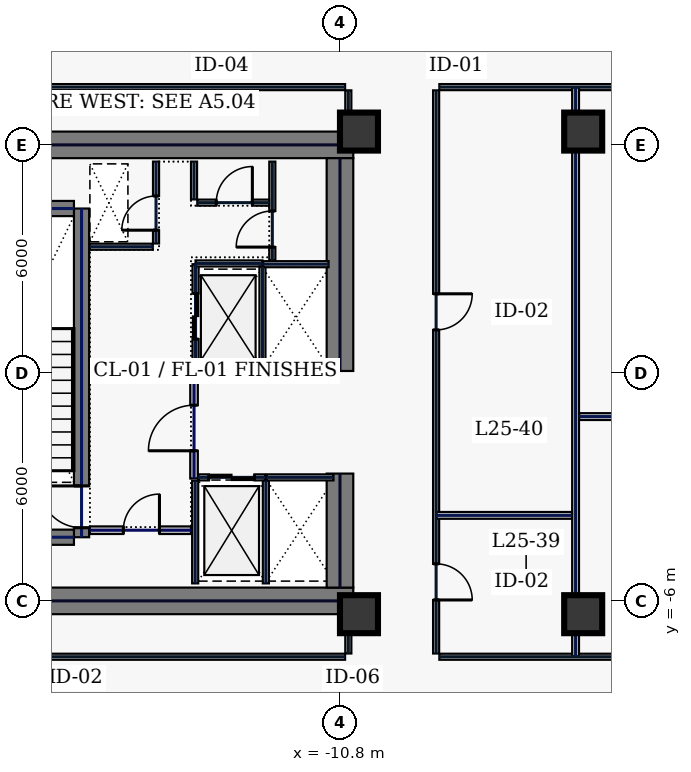
"""IFC4 building model, lengths in metres.
Left out: names, types, materials, properties, quantities, classifications, styles, units other than length and angle.
Written with IfcOpenShell. Run it as: python <this file> out.ifc"""

import sys

from ifc_helpers import new_model, si_unit, direction, frame, frame_2d, origin, origin_2d, place, context, subcontext, project, spatial, rectangle, hollow_rectangle, extrude, element, fill, save


model = new_model("IFC4")
c1 = context("Model", 3, precision=1e-05, world=origin(), true_north=direction((0.0, 1.0)))
c2 = subcontext(c1, "Body", "Model", "MODEL_VIEW")
j1 = project(units=[si_unit("LENGTHUNIT", "METRE"), si_unit("PLANEANGLEUNIT", "RADIAN")], contexts=[c1])
p1 = place(None, origin())
s1 = spatial("IfcSite", under=j1, at=p1, CompositionType="ELEMENT")
p2 = place(p1, origin())
s2 = spatial("IfcBuilding", under=s1, at=p2, CompositionType="ELEMENT")
p3 = place(p2, frame((0.0, 0.0, 113.4)))
s3 = spatial("IfcBuildingStorey", under=s2, at=p3, CompositionType="ELEMENT", Elevation=113.4)
for number, where, z_axis, x_axis in (
    (1, (-22.0, 6.0, 0.0), (0.0, 0.0, 1.0), (1.0, 0.0, 0.0)),
    (2, (-22.0, -6.0, 0.0), (0.0, 0.0, 1.0), (1.0, 0.0, 0.0)),
):
    element("IfcWall", number, at=place(p3, frame(where, z_axis=z_axis, x_axis=x_axis)), inside=s3, PredefinedType="SHEAR", context=c2, shape_type="SweptSolid", body=[
        extrude(rectangle(XDim=11.55, YDim=0.7, at=frame_2d((5.775, 0.0))), origin(), (0.0, 0.0, 1.0), 3.74),
    ])
p4 = place(p3, frame((-10.8, -5.65, 0.0), z_axis=(0.0, 0.0, 1.0), x_axis=(0.0, 1.0, 0.0)))
e3 = element("IfcWall", 3, at=p4, inside=s3, PredefinedType="SHEAR", context=c2, shape_type="SweptSolid", body=[
    extrude(rectangle(XDim=3.0, YDim=0.7, at=frame_2d((1.5, 0.0))), origin(), (0.0, 0.0, 1.0), 3.74),
])
p5 = place(p3, frame((-10.8, 0.05, 0.0), z_axis=(0.0, 0.0, 1.0), x_axis=(0.0, 1.0, 0.0)))
e4 = element("IfcWall", 4, at=p5, inside=s3, PredefinedType="SHEAR", context=c2, shape_type="SweptSolid", body=[
    extrude(rectangle(XDim=5.6, YDim=0.7, at=frame_2d((2.8, 0.0))), origin(), (0.0, 0.0, 1.0), 3.74),
])
p6 = place(p3, frame((-17.6, -4.325, 0.0), z_axis=(0.0, 0.0, 1.0), x_axis=(0.0, 1.0, 0.0)))
e5 = element("IfcWall", 5, at=p6, inside=s3, PredefinedType="SHEAR", context=c2, shape_type="SweptSolid", body=[
    extrude(rectangle(XDim=8.65, YDim=0.4, at=frame_2d((4.325, 0.0))), origin(), (0.0, 0.0, 1.0), 3.74),
])
p7 = place(p6, frame((0.25, 0.0, 0.0)))
e6 = element("IfcOpeningElement", 6, at=p7, cuts=e5, PredefinedType="OPENING", context=c2, shape_type="SweptSolid", body=[
    extrude(rectangle(XDim=1.1, YDim=2.2, at=frame_2d((0.55, 1.1))), frame((0.0, 0.21, 0.0), z_axis=(0.0, -1.0, 0.0), x_axis=(1.0, 0.0, 0.0)), (0.0, 0.0, 1.0), 0.42),
])
for number, where, z_axis, x_axis in (
    (7, (-21.2, -4.325, 0.0), (0.0, 0.0, 1.0), (1.0, 0.0, 0.0)),
    (8, (-21.2, 4.325, 0.0), (0.0, 0.0, 1.0), (1.0, 0.0, 0.0)),
):
    element("IfcWall", number, at=place(p3, frame(where, z_axis=z_axis, x_axis=x_axis)), inside=s3, PredefinedType="SHEAR", context=c2, shape_type="SweptSolid", body=[
        extrude(rectangle(XDim=3.4, YDim=0.4, at=frame_2d((1.7, 0.0))), origin(), (0.0, 0.0, 1.0), 3.74),
    ])
for number, where, z_axis, x_axis in (
    (9, (-10.3, -6.35, 0.0), (0.0, 0.0, 1.0), (1.0, 0.0, 0.0)),
    (10, (-10.3, 6.35, 0.0), (0.0, 0.0, 1.0), (1.0, 0.0, 0.0)),
    (11, (-4.4, -6.35, 0.0), (0.0, 0.0, 1.0), (1.0, 0.0, 0.0)),
    (12, (-4.4, 6.35, 0.0), (0.0, 0.0, 1.0), (1.0, 0.0, 0.0)),
):
    element("IfcColumn", number, at=place(p3, frame(where, z_axis=z_axis, x_axis=x_axis)), inside=s3, PredefinedType="COLUMN", context=c2, shape_type="SweptSolid", body=[
        extrude(hollow_rectangle(XDim=1.0, YDim=1.0, WallThickness=0.045, at=origin_2d()), origin(), (0.0, 0.0, 1.0), 3.74),
    ])
p8 = place(p3, frame((-14.6, 0.12, 0.0), z_axis=(0.0, 0.0, 1.0), x_axis=(0.0, 1.0, 0.0)))
e13 = element("IfcWall", 13, at=p8, inside=s3, PredefinedType="PARTITIONING", context=c2, shape_type="SweptSolid", body=[
    extrude(rectangle(XDim=2.74, YDim=0.16, at=frame_2d((1.37, 0.0))), origin(), (0.0, 0.0, 1.0), 3.74),
])
p9 = place(p8, frame((0.77, 0.0, 0.0)))
e14 = element("IfcOpeningElement", 14, at=p9, cuts=e13, PredefinedType="OPENING", context=c2, shape_type="SweptSolid", body=[
    extrude(rectangle(XDim=1.2, YDim=2.2, at=frame_2d((0.6, 1.1))), frame((0.0, 0.09, 0.0), z_axis=(0.0, -1.0, 0.0), x_axis=(1.0, 0.0, 0.0)), (0.0, 0.0, 1.0), 0.18),
])
for number, where, z_axis, x_axis in (
    (15, (-14.6, 0.1, 0.0), (0.0, 0.0, 1.0), (1.0, 0.0, 0.0)),
    (16, (-14.6, 2.88, 0.0), (0.0, 0.0, 1.0), (1.0, 0.0, 0.0)),
):
    element("IfcWall", number, at=place(p3, frame(where, z_axis=z_axis, x_axis=x_axis)), inside=s3, PredefinedType="PARTITIONING", context=c2, shape_type="SweptSolid", body=[
        extrude(rectangle(XDim=1.76, YDim=0.16, at=frame_2d((0.88, 0.0))), origin(), (0.0, 0.0, 1.0), 3.74),
    ])
p10 = place(p3, frame((-12.84, 0.18, 0.0), z_axis=(0.0, 0.0, 1.0), x_axis=(0.0, 1.0, 0.0)))
e17 = element("IfcWall", 17, at=p10, inside=s3, PredefinedType="PARTITIONING", context=c2, shape_type="SweptSolid", body=[
    extrude(rectangle(XDim=2.62, YDim=0.16, at=frame_2d((1.31, 0.0))), origin(), (0.0, 0.0, 1.0), 3.74),
])
p11 = place(p3, frame((-14.53, -2.75, 0.0), z_axis=(0.0, 0.0, 1.0), x_axis=(1.0, 0.0, 0.0)))
e18 = element("IfcWall", 18, at=p11, inside=s3, PredefinedType="PARTITIONING", context=c2, shape_type="SweptSolid", body=[
    extrude(rectangle(XDim=1.76, YDim=0.16, at=frame_2d((0.88, 0.0))), origin(), (0.0, 0.0, 1.0), 3.74),
])
p12 = place(p11, frame((0.28, 0.0, 0.0)))
e19 = element("IfcOpeningElement", 19, at=p12, cuts=e18, PredefinedType="OPENING", context=c2, shape_type="SweptSolid", body=[
    extrude(rectangle(XDim=1.2, YDim=2.2, at=frame_2d((0.6, 1.1))), frame((0.0, 0.09, 0.0), z_axis=(0.0, -1.0, 0.0), x_axis=(1.0, 0.0, 0.0)), (0.0, 0.0, 1.0), 0.18),
])
for number, where, z_axis, x_axis in (
    (20, (-12.75, -5.54, 0.0), (0.0, 0.0, 1.0), (0.0, 1.0, 0.0)),
    (21, (-14.61, -5.54, 0.0), (0.0, 0.0, 1.0), (0.0, 1.0, 0.0)),
):
    element("IfcWall", number, at=place(p3, frame(where, z_axis=z_axis, x_axis=x_axis)), inside=s3, PredefinedType="PARTITIONING", context=c2, shape_type="SweptSolid", body=[
        extrude(rectangle(XDim=2.7, YDim=0.16, at=frame_2d((1.35, 0.0))), origin(), (0.0, 0.0, 1.0), 3.74),
    ])
p13 = place(p3, frame((-12.73, -2.75, 0.0), z_axis=(0.0, 0.0, 1.0), x_axis=(1.0, 0.0, 0.0)))
e22 = element("IfcWall", 22, at=p13, inside=s3, PredefinedType="PARTITIONING", context=c2, shape_type="SweptSolid", body=[
    extrude(rectangle(XDim=1.76, YDim=0.16, at=frame_2d((0.88, 0.0))), origin(), (0.0, 0.0, 1.0), 3.74),
])
for number, where, z_axis, x_axis in (
    (23, (-12.82, 0.06, 0.0), (0.0, 0.0, 1.0), (1.0, 0.0, 0.0)),
    (24, (-12.82, 2.86, 0.0), (0.0, 0.0, 1.0), (1.0, 0.0, 0.0)),
):
    element("IfcWall", number, at=place(p3, frame(where, z_axis=z_axis, x_axis=x_axis)), inside=s3, PredefinedType="PARTITIONING", context=c2, shape_type="SweptSolid", body=[
        extrude(rectangle(XDim=1.72, YDim=0.16, at=frame_2d((0.86, 0.0))), origin(), (0.0, 0.0, 1.0), 3.74),
    ])
p14 = place(p3, frame((-15.64, 3.405, 0.0), z_axis=(0.0, 0.0, 1.0), x_axis=(0.0, 1.0, 0.0)))
e25 = element("IfcWall", 25, at=p14, inside=s3, PredefinedType="PARTITIONING", context=c2, shape_type="SweptSolid", body=[
    extrude(rectangle(XDim=2.155, YDim=0.16, at=frame_2d((1.078, 0.0))), origin(), (0.0, 0.0, 1.0), 3.74),
])
p15 = place(p14, frame((0.35, 0.0, 0.0)))
e26 = element("IfcOpeningElement", 26, at=p15, cuts=e25, PredefinedType="OPENING", context=c2, shape_type="SweptSolid", body=[
    extrude(rectangle(XDim=0.9, YDim=2.2, at=frame_2d((0.45, 1.1))), frame((0.0, 0.09, 0.0), z_axis=(0.0, -1.0, 0.0), x_axis=(1.0, 0.0, 0.0)), (0.0, 0.0, 1.0), 0.18),
])
p16 = place(p3, frame((-17.38, 3.32, 0.0), z_axis=(0.0, 0.0, 1.0), x_axis=(1.0, 0.0, 0.0)))
e27 = element("IfcWall", 27, at=p16, inside=s3, PredefinedType="PARTITIONING", context=c2, shape_type="SweptSolid", body=[
    extrude(rectangle(XDim=1.655, YDim=0.16, at=frame_2d((0.827, 0.0))), origin(), (0.0, 0.0, 1.0), 3.74),
])
p17 = place(p3, frame((-17.38, -4.14, 0.0), z_axis=(0.0, 0.0, 1.0), x_axis=(1.0, 0.0, 0.0)))
e28 = element("IfcWall", 28, at=p17, inside=s3, PredefinedType="SOLIDWALL", context=c2, shape_type="SweptSolid", body=[
    extrude(rectangle(XDim=2.66, YDim=0.2, at=frame_2d((1.33, 0.0))), origin(), (0.0, 0.0, 1.0), 3.74),
])
p18 = place(p17, frame((0.88, 0.0, 0.0)))
e29 = element("IfcOpeningElement", 29, at=p18, cuts=e28, PredefinedType="OPENING", context=c2, shape_type="SweptSolid", body=[
    extrude(rectangle(XDim=0.95, YDim=2.2, at=frame_2d((0.475, 1.1))), frame((0.0, 0.11, 0.0), z_axis=(0.0, -1.0, 0.0), x_axis=(1.0, 0.0, 0.0)), (0.0, 0.0, 1.0), 0.22),
])
p19 = place(p3, frame((-12.58, 2.96, 0.0), z_axis=(0.0, 0.0, 1.0), x_axis=(0.0, 1.0, 0.0)))
e30 = element("IfcWall", 30, at=p19, inside=s3, PredefinedType="PARTITIONING", context=c2, shape_type="SweptSolid", body=[
    extrude(rectangle(XDim=2.6, YDim=0.16, at=frame_2d((1.3, 0.0))), origin(), (0.0, 0.0, 1.0), 3.74),
])
p20 = place(p19, frame((0.35, 0.0, 0.0)))
e31 = element("IfcOpeningElement", 31, at=p20, cuts=e30, PredefinedType="OPENING", context=c2, shape_type="SweptSolid", body=[
    extrude(rectangle(XDim=0.95, YDim=2.2, at=frame_2d((0.475, 1.1))), frame((0.0, 0.09, 0.0), z_axis=(0.0, -1.0, 0.0), x_axis=(1.0, 0.0, 0.0)), (0.0, 0.0, 1.0), 0.18),
])
p21 = place(p3, frame((-14.555, 4.48, 0.0), z_axis=(0.0, 0.0, 1.0), x_axis=(1.0, 0.0, 0.0)))
e32 = element("IfcWall", 32, at=p21, inside=s3, PredefinedType="PARTITIONING", context=c2, shape_type="SweptSolid", body=[
    extrude(rectangle(XDim=1.89, YDim=0.16, at=frame_2d((0.945, 0.0))), origin(), (0.0, 0.0, 1.0), 3.74),
])
p22 = place(p21, frame((0.5, 0.0, 0.0)))
e33 = element("IfcOpeningElement", 33, at=p22, cuts=e32, PredefinedType="OPENING", context=c2, shape_type="SweptSolid", body=[
    extrude(rectangle(XDim=0.95, YDim=2.2, at=frame_2d((0.475, 1.1))), frame((0.0, 0.09, 0.0), z_axis=(0.0, -1.0, 0.0), x_axis=(1.0, 0.0, 0.0)), (0.0, 0.0, 1.0), 0.18),
])
p23 = place(p3, frame((-14.64, 4.565, 0.0), z_axis=(0.0, 0.0, 1.0), x_axis=(0.0, 1.0, 0.0)))
e34 = element("IfcWall", 34, at=p23, inside=s3, PredefinedType="PARTITIONING", context=c2, shape_type="SweptSolid", body=[
    extrude(rectangle(XDim=0.995, YDim=0.16, at=frame_2d((0.498, 0.0))), origin(), (0.0, 0.0, 1.0), 3.74),
])
p24 = place(p3, frame((-14.64, -2.78, 0.0), z_axis=(0.0, 0.0, 1.0), x_axis=(0.0, 1.0, 0.0)))
e35 = element("IfcWall", 35, at=p24, inside=s3, PredefinedType="SOLIDWALL", context=c2, shape_type="SweptSolid", body=[
    extrude(rectangle(XDim=2.82, YDim=0.2, at=frame_2d((1.41, 0.0))), origin(), (0.0, 0.0, 1.0), 3.74),
])
p25 = place(p24, frame((0.73, 0.0, 0.0)))
e36 = element("IfcOpeningElement", 36, at=p25, cuts=e35, PredefinedType="OPENING", context=c2, shape_type="SweptSolid", body=[
    extrude(rectangle(XDim=1.2, YDim=2.2, at=frame_2d((0.6, 1.1))), frame((0.0, 0.11, 0.0), z_axis=(0.0, -1.0, 0.0), x_axis=(1.0, 0.0, 0.0)), (0.0, 0.0, 1.0), 0.22),
])
p26 = place(p3, frame((8.185, 7.52, 0.0), z_axis=(0.0, 0.0, 1.0), x_axis=(-1.0, 0.0, 0.0)))
e37 = element("IfcWall", 37, at=p26, inside=s3, PredefinedType="PARTITIONING", context=c2, shape_type="SweptSolid", body=[
    extrude(rectangle(XDim=16.37, YDim=0.16, at=frame_2d((8.185, 0.0))), origin(), (0.0, 0.0, 1.0), 3.74),
])
p27 = place(p26, frame((7.795, 0.0, 0.0)))
e38 = element("IfcOpeningElement", 38, at=p27, cuts=e37, PredefinedType="OPENING", context=c2, shape_type="SweptSolid", body=[
    extrude(rectangle(XDim=0.95, YDim=2.2, at=frame_2d((0.475, 1.1))), frame((0.0, 0.09, 0.0), z_axis=(0.0, -1.0, 0.0), x_axis=(1.0, 0.0, 0.0)), (0.0, 0.0, 1.0), 0.18),
])
p28 = place(p3, frame((-8.27, 7.435, 0.0), z_axis=(0.0, 0.0, 1.0), x_axis=(0.0, -1.0, 0.0)))
e39 = element("IfcWall", 39, at=p28, inside=s3, PredefinedType="PARTITIONING", context=c2, shape_type="SweptSolid", body=[
    extrude(rectangle(XDim=14.82, YDim=0.16, at=frame_2d((7.41, 0.0))), origin(), (0.0, 0.0, 1.0), 3.74),
])
p29 = place(p28, frame((12.461, 0.0, 0.0)))
e40 = element("IfcOpeningElement", 40, at=p29, cuts=e39, PredefinedType="OPENING", context=c2, shape_type="SweptSolid", body=[
    extrude(rectangle(XDim=0.95, YDim=2.2, at=frame_2d((0.475, 1.1))), frame((0.0, 0.09, 0.0), z_axis=(0.0, -1.0, 0.0), x_axis=(1.0, 0.0, 0.0)), (0.0, 0.0, 1.0), 0.18),
])
p30 = place(p28, frame((5.354, 0.0, 0.0)))
e41 = element("IfcOpeningElement", 41, at=p30, cuts=e39, PredefinedType="OPENING", context=c2, shape_type="SweptSolid", body=[
    extrude(rectangle(XDim=0.95, YDim=2.2, at=frame_2d((0.475, 1.1))), frame((0.0, 0.09, 0.0), z_axis=(0.0, -1.0, 0.0), x_axis=(1.0, 0.0, 0.0)), (0.0, 0.0, 1.0), 0.18),
])
p31 = place(p3, frame((-8.185, -7.47, 0.0), z_axis=(0.0, 0.0, 1.0), x_axis=(1.0, 0.0, 0.0)))
e42 = element("IfcWall", 42, at=p31, inside=s3, PredefinedType="PARTITIONING", context=c2, shape_type="SweptSolid", body=[
    extrude(rectangle(XDim=16.37, YDim=0.16, at=frame_2d((8.185, 0.0))), origin(), (0.0, 0.0, 1.0), 3.74),
])
p32 = place(p31, frame((7.795, 0.0, 0.0)))
e43 = element("IfcOpeningElement", 43, at=p32, cuts=e42, PredefinedType="OPENING", context=c2, shape_type="SweptSolid", body=[
    extrude(rectangle(XDim=0.95, YDim=2.2, at=frame_2d((0.475, 1.1))), frame((0.0, 0.09, 0.0), z_axis=(0.0, -1.0, 0.0), x_axis=(1.0, 0.0, 0.0)), (0.0, 0.0, 1.0), 0.18),
])
p33 = place(p31, frame((14.336, 0.0, 0.0)))
e44 = element("IfcOpeningElement", 44, at=p33, cuts=e42, PredefinedType="OPENING", context=c2, shape_type="SweptSolid", body=[
    extrude(rectangle(XDim=0.95, YDim=2.2, at=frame_2d((0.475, 1.1))), frame((0.0, 0.09, 0.0), z_axis=(0.0, -1.0, 0.0), x_axis=(1.0, 0.0, 0.0)), (0.0, 0.0, 1.0), 0.18),
])
p34 = place(p3, frame((-10.58, -7.385, 0.0), z_axis=(0.0, 0.0, 1.0), x_axis=(0.0, 1.0, 0.0)))
e45 = element("IfcWall", 45, at=p34, inside=s3, PredefinedType="PARTITIONING", context=c2, shape_type="SweptSolid", body=[
    extrude(rectangle(XDim=0.965, YDim=0.16, at=frame_2d((0.482, 0.0))), origin(), (0.0, 0.0, 1.0), 3.74),
])
p35 = place(p3, frame((-10.58, 6.42, 0.0), z_axis=(0.0, 0.0, 1.0), x_axis=(0.0, 1.0, 0.0)))
e46 = element("IfcWall", 46, at=p35, inside=s3, PredefinedType="PARTITIONING", context=c2, shape_type="SweptSolid", body=[
    extrude(rectangle(XDim=1.015, YDim=0.16, at=frame_2d((0.508, 0.0))), origin(), (0.0, 0.0, 1.0), 3.74),
])
for number, where, z_axis, x_axis in (
    (47, (-10.665, 7.52, 0.0), (0.0, 0.0, 1.0), (-1.0, 0.0, 0.0)),
    (48, (-25.235, -7.47, 0.0), (0.0, 0.0, 1.0), (1.0, 0.0, 0.0)),
):
    element("IfcWall", number, at=place(p3, frame(where, z_axis=z_axis, x_axis=x_axis)), inside=s3, PredefinedType="PARTITIONING", context=c2, shape_type="SweptSolid", body=[
        extrude(rectangle(XDim=14.57, YDim=0.16, at=frame_2d((7.285, 0.0))), origin(), (0.0, 0.0, 1.0), 3.74),
    ])
p36 = place(p3, frame((-4.6, -7.465, 0.0), z_axis=(0.0, 0.0, 1.0), x_axis=(0.0, 1.0, 0.0)))
e49 = element("IfcWall", 49, at=p36, inside=s3, PredefinedType="PARTITIONING", context=c2, shape_type="SweptSolid", body=[
    extrude(rectangle(XDim=14.98, YDim=0.18, at=frame_2d((7.49, 0.0))), origin(), (0.0, 0.0, 1.0), 2.935),
])
p37 = place(p3, frame((-4.505, -1.15, 0.0), z_axis=(0.0, 0.0, 1.0), x_axis=(1.0, 0.0, 0.0)))
e50 = element("IfcWall", 50, at=p37, inside=s3, PredefinedType="PARTITIONING", context=c2, shape_type="SweptSolid", body=[
    extrude(rectangle(XDim=9.01, YDim=0.18, at=frame_2d((4.505, 0.0))), origin(), (0.0, 0.0, 1.0), 3.74),
])
p38 = place(p3, frame((-8.265, -3.75, 0.0), z_axis=(0.0, 0.0, 1.0), x_axis=(1.0, 0.0, 0.0)))
e51 = element("IfcWall", 51, at=p38, inside=s3, PredefinedType="PARTITIONING", context=c2, shape_type="SweptSolid", body=[
    extrude(rectangle(XDim=3.57, YDim=0.18, at=frame_2d((1.785, 0.0))), origin(), (0.0, 0.0, 1.0), 3.74),
])
p39 = place(p7, origin())
e52 = element("IfcDoor", 52, at=p39, inside=s3, OperationType="SINGLE_SWING_RIGHT", PredefinedType="DOOR", context=c2, shape_type="SweptSolid", body=[
    extrude(rectangle(XDim=1.1, YDim=2.2, at=frame_2d((0.55, 1.1))), frame((0.0, 0.025, 0.0), z_axis=(0.0, -1.0, 0.0), x_axis=(1.0, 0.0, 0.0)), (0.0, 0.0, 1.0), 0.05),
])
fill(e6, e52)
p40 = place(p9, origin())
e53 = element("IfcDoor", 53, at=p40, inside=s3, OperationType="SLIDING_TO_LEFT", PredefinedType="DOOR", context=c2, shape_type="SweptSolid", body=[
    extrude(rectangle(XDim=1.2, YDim=2.2, at=frame_2d((0.6, 1.1))), frame((0.0, 0.025, 0.0), z_axis=(0.0, -1.0, 0.0), x_axis=(1.0, 0.0, 0.0)), (0.0, 0.0, 1.0), 0.05),
])
fill(e14, e53)
p41 = place(p12, origin())
e54 = element("IfcDoor", 54, at=p41, inside=s3, OperationType="SLIDING_TO_LEFT", PredefinedType="DOOR", context=c2, shape_type="SweptSolid", body=[
    extrude(rectangle(XDim=1.2, YDim=2.2, at=frame_2d((0.6, 1.1))), frame((0.0, 0.025, 0.0), z_axis=(0.0, -1.0, 0.0), x_axis=(1.0, 0.0, 0.0)), (0.0, 0.0, 1.0), 0.05),
])
fill(e19, e54)
p42 = place(p15, origin())
e55 = element("IfcDoor", 55, at=p42, inside=s3, OperationType="SINGLE_SWING_LEFT", PredefinedType="DOOR", context=c2, shape_type="SweptSolid", body=[
    extrude(rectangle(XDim=0.9, YDim=2.2, at=frame_2d((0.45, 1.1))), frame((0.0, 0.025, 0.0), z_axis=(0.0, -1.0, 0.0), x_axis=(1.0, 0.0, 0.0)), (0.0, 0.0, 1.0), 0.05),
])
fill(e26, e55)
p43 = place(p18, origin())
e56 = element("IfcDoor", 56, at=p43, inside=s3, OperationType="SINGLE_SWING_RIGHT", PredefinedType="DOOR", context=c2, shape_type="SweptSolid", body=[
    extrude(rectangle(XDim=0.95, YDim=2.2, at=frame_2d((0.475, 1.1))), frame((0.0, 0.025, 0.0), z_axis=(0.0, -1.0, 0.0), x_axis=(1.0, 0.0, 0.0)), (0.0, 0.0, 1.0), 0.05),
])
fill(e29, e56)
p44 = place(p20, origin())
e57 = element("IfcDoor", 57, at=p44, inside=s3, OperationType="SINGLE_SWING_LEFT", PredefinedType="DOOR", context=c2, shape_type="SweptSolid", body=[
    extrude(rectangle(XDim=0.95, YDim=2.2, at=frame_2d((0.475, 1.1))), frame((0.0, 0.025, 0.0), z_axis=(0.0, -1.0, 0.0), x_axis=(1.0, 0.0, 0.0)), (0.0, 0.0, 1.0), 0.05),
])
fill(e31, e57)
p45 = place(p22, origin())
e58 = element("IfcDoor", 58, at=p45, inside=s3, OperationType="SINGLE_SWING_RIGHT", PredefinedType="DOOR", context=c2, shape_type="SweptSolid", body=[
    extrude(rectangle(XDim=0.95, YDim=2.2, at=frame_2d((0.475, 1.1))), frame((0.0, 0.025, 0.0), z_axis=(0.0, -1.0, 0.0), x_axis=(1.0, 0.0, 0.0)), (0.0, 0.0, 1.0), 0.05),
])
fill(e33, e58)
p46 = place(p25, origin())
e59 = element("IfcDoor", 59, at=p46, inside=s3, OperationType="SINGLE_SWING_LEFT", PredefinedType="DOOR", context=c2, shape_type="SweptSolid", body=[
    extrude(rectangle(XDim=1.2, YDim=2.2, at=frame_2d((0.6, 1.1))), frame((0.0, 0.025, 0.0), z_axis=(0.0, -1.0, 0.0), x_axis=(1.0, 0.0, 0.0)), (0.0, 0.0, 1.0), 0.05),
])
fill(e36, e59)
p47 = place(p29, origin())
e60 = element("IfcDoor", 60, at=p47, inside=s3, OperationType="SINGLE_SWING_RIGHT", PredefinedType="DOOR", context=c2, shape_type="SweptSolid", body=[
    extrude(rectangle(XDim=0.95, YDim=2.2, at=frame_2d((0.475, 1.1))), frame((0.0, 0.025, 0.0), z_axis=(0.0, -1.0, 0.0), x_axis=(1.0, 0.0, 0.0)), (0.0, 0.0, 1.0), 0.05),
])
fill(e40, e60)
p48 = place(p30, origin())
e61 = element("IfcDoor", 61, at=p48, inside=s3, OperationType="SINGLE_SWING_LEFT", PredefinedType="DOOR", context=c2, shape_type="SweptSolid", body=[
    extrude(rectangle(XDim=0.95, YDim=2.2, at=frame_2d((0.475, 1.1))), frame((0.0, 0.025, 0.0), z_axis=(0.0, -1.0, 0.0), x_axis=(1.0, 0.0, 0.0)), (0.0, 0.0, 1.0), 0.05),
])
fill(e41, e61)
save(model, sys.argv[1])
